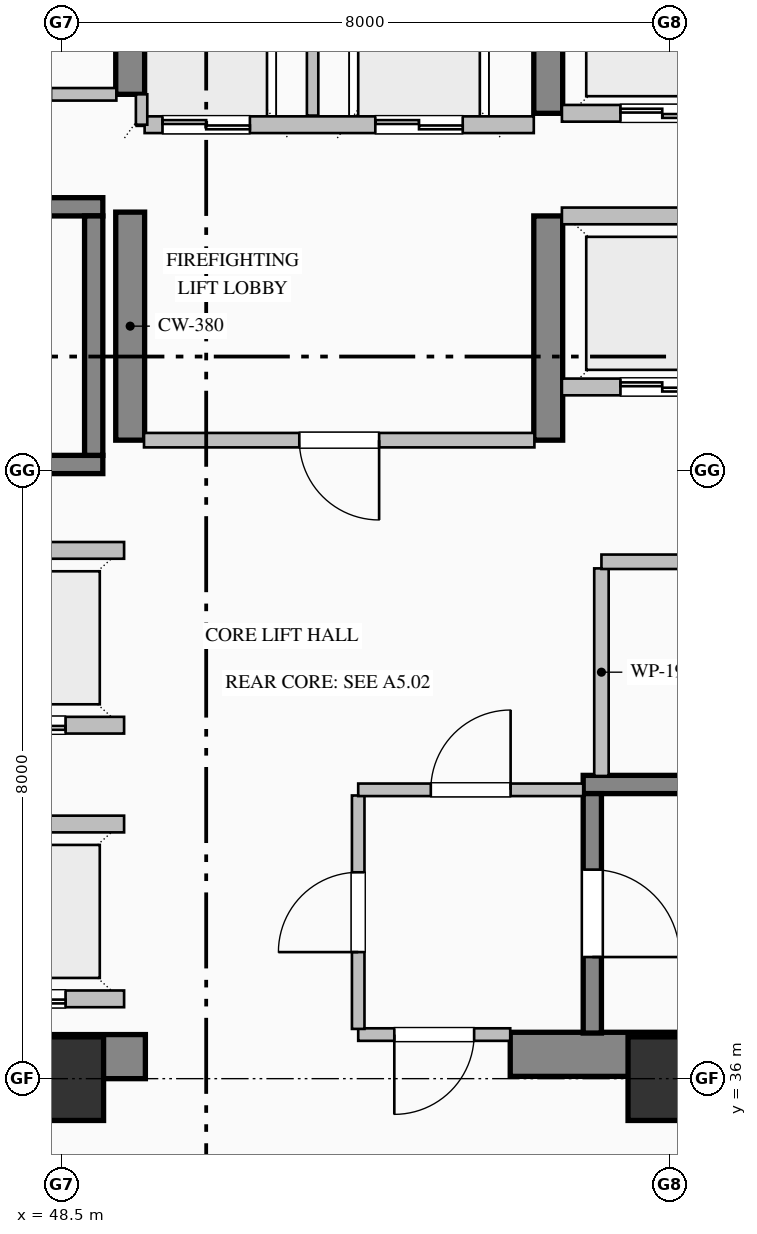
"""IFC4 building model, lengths in metres.
Left out: names, types, materials, properties, quantities, classifications, styles, units other than length and angle.
Written with IfcOpenShell. Run it as: python <this file> out.ifc"""

import sys

from ifc_helpers import new_model, si_unit, direction, frame, frame_2d, origin, origin_2d, place, context, subcontext, project, spatial, rectangle, extrude, element, fill, save


model = new_model("IFC4")
c1 = context("Model", 3, precision=1e-05, world=origin(), true_north=direction((0.0, 1.0)))
c2 = subcontext(c1, "Body", "Model", "MODEL_VIEW")
j1 = project(units=[si_unit("LENGTHUNIT", "METRE"), si_unit("PLANEANGLEUNIT", "RADIAN")], contexts=[c1])
p1 = place(None, origin())
s1 = spatial("IfcSite", under=j1, at=p1, CompositionType="ELEMENT")
p2 = place(p1, origin())
s2 = spatial("IfcBuilding", under=s1, at=p2, CompositionType="ELEMENT")
p3 = place(p2, origin())
s3 = spatial("IfcBuildingStorey", under=s2, at=p3, CompositionType="ELEMENT", Elevation=0.0)
p4 = place(p3, frame((48.2, 36.29, 0.0), z_axis=(0.0, 0.0, 1.0), x_axis=(1.0, 0.0, 0.0)))
e1 = element("IfcWall", 1, at=p4, inside=s3, PredefinedType="SHEAR", context=c2, shape_type="SweptSolid", body=[
    extrude(rectangle(XDim=1.4, YDim=0.58, at=frame_2d((0.7, 0.0))), origin(), (0.0, 0.0, 1.0), 5.72),
])
p5 = place(p3, frame((54.4, 36.32, 0.0), z_axis=(0.0, 0.0, 1.0), x_axis=(1.0, 0.0, 0.0)))
e2 = element("IfcWall", 2, at=p5, inside=s3, PredefinedType="SHEAR", context=c2, shape_type="SweptSolid", body=[
    extrude(rectangle(XDim=9.6, YDim=0.58, at=frame_2d((4.8, 0.0))), origin(), (0.0, 0.0, 1.0), 6.0),
])
p6 = place(p3, frame((49.4, 44.4, 0.0), z_axis=(0.0, 0.0, 1.0), x_axis=(0.0, 1.0, 0.0)))
e3 = element("IfcWall", 3, at=p6, inside=s3, PredefinedType="SHEAR", context=c2, shape_type="SweptSolid", body=[
    extrude(rectangle(XDim=3.0, YDim=0.38, at=frame_2d((1.5, 0.0))), origin(), (0.0, 0.0, 1.0), 5.72),
])
p7 = place(p3, frame((49.4, 48.95, 0.0), z_axis=(0.0, 0.0, 1.0), x_axis=(0.0, 1.0, 0.0)))
e4 = element("IfcWall", 4, at=p7, inside=s3, PredefinedType="SHEAR", context=c2, shape_type="SweptSolid", body=[
    extrude(rectangle(XDim=2.47, YDim=0.38, at=frame_2d((1.235, 0.0))), origin(), (0.0, 0.0, 1.0), 5.72),
])
p8 = place(p3, frame((54.9, 44.4, 0.0), z_axis=(0.0, 0.0, 1.0), x_axis=(0.0, 1.0, 0.0)))
e5 = element("IfcWall", 5, at=p8, inside=s3, PredefinedType="SHEAR", context=c2, shape_type="SweptSolid", body=[
    extrude(rectangle(XDim=2.95, YDim=0.38, at=frame_2d((1.475, 0.0))), origin(), (0.0, 0.0, 1.0), 5.72),
])
p9 = place(p3, frame((54.9, 48.7, 0.0), z_axis=(0.0, 0.0, 1.0), x_axis=(0.0, 1.0, 0.0)))
e6 = element("IfcWall", 6, at=p9, inside=s3, PredefinedType="SHEAR", context=c2, shape_type="SweptSolid", body=[
    extrude(rectangle(XDim=2.72, YDim=0.38, at=frame_2d((1.36, 0.0))), origin(), (0.0, 0.0, 1.0), 5.72),
])
for number, where, z_axis, x_axis in (
    (7, (48.5, 36.0, 0.0), (0.0, 0.0, 1.0), (1.0, 0.0, 0.0)),
    (8, (56.5, 36.0, 0.0), (0.0, 0.0, 1.0), (1.0, 0.0, 0.0)),
):
    element("IfcColumn", number, at=place(p3, frame(where, z_axis=z_axis, x_axis=x_axis)), inside=s3, PredefinedType="COLUMN", context=c2, shape_type="SweptSolid", body=[
        extrude(rectangle(XDim=1.1, YDim=1.1, at=origin_2d()), origin(), (0.0, 0.0, 1.0), 6.0),
    ])
for number, where, z_axis, x_axis in (
    (9, (40.96, 47.47, 0.0), (0.0, 0.0, 1.0), (1.0, 0.0, 0.0)),
    (10, (49.04, 44.08, 0.0), (0.0, 0.0, 1.0), (-1.0, 0.0, 0.0)),
):
    element("IfcWall", number, at=place(p3, frame(where, z_axis=z_axis, x_axis=x_axis)), inside=s3, PredefinedType="SOLIDWALL", context=c2, shape_type="SweptSolid", body=[
        extrude(rectangle(XDim=8.08, YDim=0.24, at=frame_2d((4.04, 0.0))), origin(), (0.0, 0.0, 1.0), 6.0),
    ])
p10 = place(p3, frame((48.92, 44.2, 0.0), z_axis=(0.0, 0.0, 1.0), x_axis=(0.0, 1.0, 0.0)))
e11 = element("IfcWall", 11, at=p10, inside=s3, PredefinedType="SOLIDWALL", context=c2, shape_type="SweptSolid", body=[
    extrude(rectangle(XDim=3.15, YDim=0.24, at=frame_2d((1.575, 0.0))), origin(), (0.0, 0.0, 1.0), 6.0),
])
p11 = place(p3, frame((55.36, 39.87, 0.0), z_axis=(0.0, 0.0, 1.0), x_axis=(1.0, 0.0, 0.0)))
e12 = element("IfcWall", 12, at=p11, inside=s3, PredefinedType="SOLIDWALL", context=c2, shape_type="SweptSolid", body=[
    extrude(rectangle(XDim=8.08, YDim=0.24, at=frame_2d((4.04, 0.0))), origin(), (0.0, 0.0, 1.0), 6.0),
])
p12 = place(p3, frame((55.48, 39.75, 0.0), z_axis=(0.0, 0.0, 1.0), x_axis=(0.0, -1.0, 0.0)))
e13 = element("IfcWall", 13, at=p12, inside=s3, PredefinedType="SOLIDWALL", context=c2, shape_type="SweptSolid", body=[
    extrude(rectangle(XDim=3.15, YDim=0.24, at=frame_2d((1.575, 0.0))), origin(), (0.0, 0.0, 1.0), 6.0),
])
p13 = place(p12, frame((1.0, 0.0, 0.0)))
e14 = element("IfcOpeningElement", 14, at=p13, cuts=e13, PredefinedType="OPENING", context=c2, shape_type="SweptSolid", body=[
    extrude(rectangle(XDim=1.15, YDim=2.2, at=frame_2d((0.575, 1.1))), frame((0.0, 0.13, 0.0), z_axis=(0.0, -1.0, 0.0), x_axis=(1.0, 0.0, 0.0)), (0.0, 0.0, 1.0), 0.26),
])
p14 = place(p3, frame((54.71, 48.55, 0.0), z_axis=(0.0, 0.0, 1.0), x_axis=(-1.0, 0.0, 0.0)))
e15 = element("IfcWall", 15, at=p14, inside=s3, PredefinedType="PARTITIONING", context=c2, shape_type="SweptSolid", body=[
    extrude(rectangle(XDim=5.12, YDim=0.22, at=frame_2d((2.56, 0.0))), origin(), (0.0, 0.0, 1.0), 5.72),
])
p15 = place(p14, frame((3.735, 0.0, 0.0)))
e16 = element("IfcOpeningElement", 16, at=p15, cuts=e15, PredefinedType="OPENING", context=c2, shape_type="SweptSolid", body=[
    extrude(rectangle(XDim=1.15, YDim=2.2, at=frame_2d((0.575, 1.1))), frame((0.0, 0.12, 0.0), z_axis=(0.0, -1.0, 0.0), x_axis=(1.0, 0.0, 0.0)), (0.0, 0.0, 1.0), 0.24),
])
p16 = place(p14, frame((0.935, 0.0, 0.0)))
e17 = element("IfcOpeningElement", 17, at=p16, cuts=e15, PredefinedType="OPENING", context=c2, shape_type="SweptSolid", body=[
    extrude(rectangle(XDim=1.15, YDim=2.2, at=frame_2d((0.575, 1.1))), frame((0.0, 0.12, 0.0), z_axis=(0.0, -1.0, 0.0), x_axis=(1.0, 0.0, 0.0)), (0.0, 0.0, 1.0), 0.24),
])
p17 = place(p3, frame((51.8, 48.67, 0.0), z_axis=(0.0, 0.0, 1.0), x_axis=(0.0, 1.0, 0.0)))
e18 = element("IfcWall", 18, at=p17, inside=s3, PredefinedType="PARTITIONING", context=c2, shape_type="SweptSolid", body=[
    extrude(rectangle(XDim=2.75, YDim=0.15, at=frame_2d((1.375, 0.0))), origin(), (0.0, 0.0, 1.0), 5.72),
])
p18 = place(p3, frame((49.55, 48.55, 0.0), z_axis=(0.0, 0.0, 1.0), x_axis=(0.0, 1.0, 0.0)))
e19 = element("IfcWall", 19, at=p18, inside=s3, PredefinedType="PARTITIONING", context=c2, shape_type="SweptSolid", body=[
    extrude(rectangle(XDim=0.4, YDim=0.15, at=frame_2d((0.2, 0.0))), origin(), (0.0, 0.0, 1.0), 5.72),
])
p19 = place(p3, frame((49.32, 37.05, 0.0), z_axis=(0.0, 0.0, 1.0), x_axis=(-1.0, 0.0, 0.0)))
e20 = element("IfcWall", 20, at=p19, inside=s3, PredefinedType="PARTITIONING", context=c2, shape_type="SweptSolid", body=[
    extrude(rectangle(XDim=8.24, YDim=0.22, at=frame_2d((4.12, 0.0))), origin(), (0.0, 0.0, 1.0), 5.72),
])
p20 = place(p19, frame((6.37, 0.0, 0.0)))
e21 = element("IfcOpeningElement", 21, at=p20, cuts=e20, PredefinedType="OPENING", context=c2, shape_type="SweptSolid", body=[
    extrude(rectangle(XDim=1.1, YDim=2.2, at=frame_2d((0.55, 1.1))), frame((0.0, 0.12, 0.0), z_axis=(0.0, -1.0, 0.0), x_axis=(1.0, 0.0, 0.0)), (0.0, 0.0, 1.0), 0.24),
])
p21 = place(p19, frame((3.57, 0.0, 0.0)))
e22 = element("IfcOpeningElement", 22, at=p21, cuts=e20, PredefinedType="OPENING", context=c2, shape_type="SweptSolid", body=[
    extrude(rectangle(XDim=1.1, YDim=2.2, at=frame_2d((0.55, 1.1))), frame((0.0, 0.12, 0.0), z_axis=(0.0, -1.0, 0.0), x_axis=(1.0, 0.0, 0.0)), (0.0, 0.0, 1.0), 0.24),
])
p22 = place(p19, frame((0.77, 0.0, 0.0)))
e23 = element("IfcOpeningElement", 23, at=p22, cuts=e20, PredefinedType="OPENING", context=c2, shape_type="SweptSolid", body=[
    extrude(rectangle(XDim=1.1, YDim=2.2, at=frame_2d((0.55, 1.1))), frame((0.0, 0.12, 0.0), z_axis=(0.0, -1.0, 0.0), x_axis=(1.0, 0.0, 0.0)), (0.0, 0.0, 1.0), 0.24),
])
p23 = place(p3, frame((41.08, 39.35, 0.0), z_axis=(0.0, 0.0, 1.0), x_axis=(1.0, 0.0, 0.0)))
e24 = element("IfcWall", 24, at=p23, inside=s3, PredefinedType="PARTITIONING", context=c2, shape_type="SweptSolid", body=[
    extrude(rectangle(XDim=8.24, YDim=0.22, at=frame_2d((4.12, 0.0))), origin(), (0.0, 0.0, 1.0), 5.72),
])
p24 = place(p3, frame((49.32, 40.65, 0.0), z_axis=(0.0, 0.0, 1.0), x_axis=(-1.0, 0.0, 0.0)))
e25 = element("IfcWall", 25, at=p24, inside=s3, PredefinedType="PARTITIONING", context=c2, shape_type="SweptSolid", body=[
    extrude(rectangle(XDim=8.24, YDim=0.22, at=frame_2d((4.12, 0.0))), origin(), (0.0, 0.0, 1.0), 5.72),
])
p25 = place(p24, frame((6.37, 0.0, 0.0)))
e26 = element("IfcOpeningElement", 26, at=p25, cuts=e25, PredefinedType="OPENING", context=c2, shape_type="SweptSolid", body=[
    extrude(rectangle(XDim=1.1, YDim=2.2, at=frame_2d((0.55, 1.1))), frame((0.0, 0.12, 0.0), z_axis=(0.0, -1.0, 0.0), x_axis=(1.0, 0.0, 0.0)), (0.0, 0.0, 1.0), 0.24),
])
p26 = place(p24, frame((3.57, 0.0, 0.0)))
e27 = element("IfcOpeningElement", 27, at=p26, cuts=e25, PredefinedType="OPENING", context=c2, shape_type="SweptSolid", body=[
    extrude(rectangle(XDim=1.1, YDim=2.2, at=frame_2d((0.55, 1.1))), frame((0.0, 0.12, 0.0), z_axis=(0.0, -1.0, 0.0), x_axis=(1.0, 0.0, 0.0)), (0.0, 0.0, 1.0), 0.24),
])
p27 = place(p24, frame((0.77, 0.0, 0.0)))
e28 = element("IfcOpeningElement", 28, at=p27, cuts=e25, PredefinedType="OPENING", context=c2, shape_type="SweptSolid", body=[
    extrude(rectangle(XDim=1.1, YDim=2.2, at=frame_2d((0.55, 1.1))), frame((0.0, 0.12, 0.0), z_axis=(0.0, -1.0, 0.0), x_axis=(1.0, 0.0, 0.0)), (0.0, 0.0, 1.0), 0.24),
])
p28 = place(p3, frame((41.08, 42.95, 0.0), z_axis=(0.0, 0.0, 1.0), x_axis=(1.0, 0.0, 0.0)))
e29 = element("IfcWall", 29, at=p28, inside=s3, PredefinedType="PARTITIONING", context=c2, shape_type="SweptSolid", body=[
    extrude(rectangle(XDim=8.24, YDim=0.22, at=frame_2d((4.12, 0.0))), origin(), (0.0, 0.0, 1.0), 5.72),
])
p29 = place(p3, frame((63.32, 45.1, 0.0), z_axis=(0.0, 0.0, 1.0), x_axis=(-1.0, 0.0, 0.0)))
e30 = element("IfcWall", 30, at=p29, inside=s3, PredefinedType="PARTITIONING", context=c2, shape_type="SweptSolid", body=[
    extrude(rectangle(XDim=8.24, YDim=0.22, at=frame_2d((4.12, 0.0))), origin(), (0.0, 0.0, 1.0), 5.72),
])
p30 = place(p29, frame((6.37, 0.0, 0.0)))
e31 = element("IfcOpeningElement", 31, at=p30, cuts=e30, PredefinedType="OPENING", context=c2, shape_type="SweptSolid", body=[
    extrude(rectangle(XDim=1.1, YDim=2.2, at=frame_2d((0.55, 1.1))), frame((0.0, 0.12, 0.0), z_axis=(0.0, -1.0, 0.0), x_axis=(1.0, 0.0, 0.0)), (0.0, 0.0, 1.0), 0.24),
])
p31 = place(p29, frame((3.57, 0.0, 0.0)))
e32 = element("IfcOpeningElement", 32, at=p31, cuts=e30, PredefinedType="OPENING", context=c2, shape_type="SweptSolid", body=[
    extrude(rectangle(XDim=1.1, YDim=2.2, at=frame_2d((0.55, 1.1))), frame((0.0, 0.12, 0.0), z_axis=(0.0, -1.0, 0.0), x_axis=(1.0, 0.0, 0.0)), (0.0, 0.0, 1.0), 0.24),
])
p32 = place(p29, frame((0.77, 0.0, 0.0)))
e33 = element("IfcOpeningElement", 33, at=p32, cuts=e30, PredefinedType="OPENING", context=c2, shape_type="SweptSolid", body=[
    extrude(rectangle(XDim=1.1, YDim=2.2, at=frame_2d((0.55, 1.1))), frame((0.0, 0.12, 0.0), z_axis=(0.0, -1.0, 0.0), x_axis=(1.0, 0.0, 0.0)), (0.0, 0.0, 1.0), 0.24),
])
p33 = place(p3, frame((55.08, 47.35, 0.0), z_axis=(0.0, 0.0, 1.0), x_axis=(1.0, 0.0, 0.0)))
e34 = element("IfcWall", 34, at=p33, inside=s3, PredefinedType="PARTITIONING", context=c2, shape_type="SweptSolid", body=[
    extrude(rectangle(XDim=8.24, YDim=0.22, at=frame_2d((4.12, 0.0))), origin(), (0.0, 0.0, 1.0), 5.72),
])
p34 = place(p3, frame((63.32, 48.7, 0.0), z_axis=(0.0, 0.0, 1.0), x_axis=(-1.0, 0.0, 0.0)))
e35 = element("IfcWall", 35, at=p34, inside=s3, PredefinedType="PARTITIONING", context=c2, shape_type="SweptSolid", body=[
    extrude(rectangle(XDim=8.24, YDim=0.22, at=frame_2d((4.12, 0.0))), origin(), (0.0, 0.0, 1.0), 5.72),
])
p35 = place(p34, frame((6.37, 0.0, 0.0)))
e36 = element("IfcOpeningElement", 36, at=p35, cuts=e35, PredefinedType="OPENING", context=c2, shape_type="SweptSolid", body=[
    extrude(rectangle(XDim=1.1, YDim=2.2, at=frame_2d((0.55, 1.1))), frame((0.0, 0.12, 0.0), z_axis=(0.0, -1.0, 0.0), x_axis=(1.0, 0.0, 0.0)), (0.0, 0.0, 1.0), 0.24),
])
p36 = place(p34, frame((3.57, 0.0, 0.0)))
e37 = element("IfcOpeningElement", 37, at=p36, cuts=e35, PredefinedType="OPENING", context=c2, shape_type="SweptSolid", body=[
    extrude(rectangle(XDim=1.1, YDim=2.2, at=frame_2d((0.55, 1.1))), frame((0.0, 0.12, 0.0), z_axis=(0.0, -1.0, 0.0), x_axis=(1.0, 0.0, 0.0)), (0.0, 0.0, 1.0), 0.24),
])
p37 = place(p34, frame((0.77, 0.0, 0.0)))
e38 = element("IfcOpeningElement", 38, at=p37, cuts=e35, PredefinedType="OPENING", context=c2, shape_type="SweptSolid", body=[
    extrude(rectangle(XDim=1.1, YDim=2.2, at=frame_2d((0.55, 1.1))), frame((0.0, 0.12, 0.0), z_axis=(0.0, -1.0, 0.0), x_axis=(1.0, 0.0, 0.0)), (0.0, 0.0, 1.0), 0.24),
])
p38 = place(p3, frame((46.6, 48.95, 0.0), z_axis=(0.0, 0.0, 1.0), x_axis=(1.0, 0.0, 0.0)))
e39 = element("IfcWall", 39, at=p38, inside=s3, PredefinedType="PARTITIONING", context=c2, shape_type="SweptSolid", body=[
    extrude(rectangle(XDim=2.618, YDim=0.165, at=frame_2d((1.309, 0.0))), origin(), (0.0, 0.0, 1.0), 5.72),
])
p39 = place(p38, frame((0.859, 0.0, 0.0)))
e40 = element("IfcOpeningElement", 40, at=p39, cuts=e39, PredefinedType="OPENING", context=c2, shape_type="SweptSolid", body=[
    extrude(rectangle(XDim=0.9, YDim=2.15, at=frame_2d((0.45, 1.075))), frame((0.0, 0.093, 0.0), z_axis=(0.0, -1.0, 0.0), x_axis=(1.0, 0.0, 0.0)), (0.0, 0.0, 1.0), 0.185),
])
p40 = place(p3, frame((54.4, 36.58, 0.0), z_axis=(0.0, 0.0, 1.0), x_axis=(-1.0, 0.0, 0.0)))
e41 = element("IfcWall", 41, at=p40, inside=s3, PredefinedType="PARTITIONING", context=c2, shape_type="SweptSolid", body=[
    extrude(rectangle(XDim=2.0, YDim=0.165, at=frame_2d((1.0, 0.0))), origin(), (0.0, 0.0, 1.0), 4.812),
])
p41 = place(p40, frame((0.475, 0.0, 0.0)))
e42 = element("IfcOpeningElement", 42, at=p41, cuts=e41, PredefinedType="OPENING", context=c2, shape_type="SweptSolid", body=[
    extrude(rectangle(XDim=1.05, YDim=2.15, at=frame_2d((0.525, 1.075))), frame((0.0, 0.093, 0.0), z_axis=(0.0, -1.0, 0.0), x_axis=(1.0, 0.0, 0.0)), (0.0, 0.0, 1.0), 0.185),
])
p42 = place(p3, frame((52.4, 36.655, 0.0), z_axis=(0.0, 0.0, 1.0), x_axis=(0.0, 1.0, 0.0)))
e43 = element("IfcWall", 43, at=p42, inside=s3, PredefinedType="PARTITIONING", context=c2, shape_type="SweptSolid", body=[
    extrude(rectangle(XDim=3.071, YDim=0.165, at=frame_2d((1.536, 0.0))), origin(), (0.0, 0.0, 1.0), 5.72),
])
p43 = place(p42, frame((1.01, 0.0, 0.0)))
e44 = element("IfcOpeningElement", 44, at=p43, cuts=e43, PredefinedType="OPENING", context=c2, shape_type="SweptSolid", body=[
    extrude(rectangle(XDim=1.05, YDim=2.15, at=frame_2d((0.525, 1.075))), frame((0.0, 0.093, 0.0), z_axis=(0.0, -1.0, 0.0), x_axis=(1.0, 0.0, 0.0)), (0.0, 0.0, 1.0), 0.185),
])
p44 = place(p3, frame((52.4, 39.8, 0.0), z_axis=(0.0, 0.0, 1.0), x_axis=(1.0, 0.0, 0.0)))
e45 = element("IfcWall", 45, at=p44, inside=s3, PredefinedType="PARTITIONING", context=c2, shape_type="SweptSolid", body=[
    extrude(rectangle(XDim=2.96, YDim=0.165, at=frame_2d((1.48, 0.0))), origin(), (0.0, 0.0, 1.0), 5.72),
])
p45 = place(p44, frame((0.955, 0.0, 0.0)))
e46 = element("IfcOpeningElement", 46, at=p45, cuts=e45, PredefinedType="OPENING", context=c2, shape_type="SweptSolid", body=[
    extrude(rectangle(XDim=1.05, YDim=2.15, at=frame_2d((0.525, 1.075))), frame((0.0, 0.093, 0.0), z_axis=(0.0, -1.0, 0.0), x_axis=(1.0, 0.0, 0.0)), (0.0, 0.0, 1.0), 0.185),
])
p46 = place(p3, frame((54.718, 44.4, 0.0), z_axis=(0.0, 0.0, 1.0), x_axis=(-1.0, 0.0, 0.0)))
e47 = element("IfcWall", 47, at=p46, inside=s3, PredefinedType="PARTITIONING", context=c2, shape_type="SweptSolid", body=[
    extrude(rectangle(XDim=5.136, YDim=0.19, at=frame_2d((2.568, 0.0))), origin(), (0.0, 0.0, 1.0), 5.72),
])
p47 = place(p46, frame((2.043, 0.0, 0.0)))
e48 = element("IfcOpeningElement", 48, at=p47, cuts=e47, PredefinedType="OPENING", context=c2, shape_type="SweptSolid", body=[
    extrude(rectangle(XDim=1.05, YDim=2.15, at=frame_2d((0.525, 1.075))), frame((0.0, 0.105, 0.0), z_axis=(0.0, -1.0, 0.0), x_axis=(1.0, 0.0, 0.0)), (0.0, 0.0, 1.0), 0.21),
])
p48 = place(p3, frame((55.6, 42.713, 0.0), z_axis=(0.0, 0.0, 1.0), x_axis=(0.0, -1.0, 0.0)))
e49 = element("IfcWall", 49, at=p48, inside=s3, PredefinedType="PARTITIONING", context=c2, shape_type="SweptSolid", body=[
    extrude(rectangle(XDim=2.731, YDim=0.19, at=frame_2d((1.365, 0.0))), origin(), (0.0, 0.0, 1.0), 5.72),
])
p49 = place(p3, frame((63.42, 42.8, 0.0), z_axis=(0.0, 0.0, 1.0), x_axis=(-1.0, 0.0, 0.0)))
e50 = element("IfcWall", 50, at=p49, inside=s3, PredefinedType="PARTITIONING", context=c2, shape_type="SweptSolid", body=[
    extrude(rectangle(XDim=7.82, YDim=0.19, at=frame_2d((3.91, 0.0))), origin(), (0.0, 0.0, 1.0), 5.72),
])
p50 = place(p49, frame((3.21, 0.0, 0.0)))
e51 = element("IfcOpeningElement", 51, at=p50, cuts=e50, PredefinedType="OPENING", context=c2, shape_type="SweptSolid", body=[
    extrude(rectangle(XDim=1.4, YDim=2.25, at=frame_2d((0.7, 1.125))), frame((0.0, 0.105, 0.0), z_axis=(0.0, -1.0, 0.0), x_axis=(1.0, 0.0, 0.0)), (0.0, 0.0, 1.0), 0.21),
])
p51 = place(p13, origin())
e52 = element("IfcDoor", 52, at=p51, inside=s3, OperationType="SINGLE_SWING_RIGHT", PredefinedType="DOOR", context=c2, shape_type="SweptSolid", body=[
    extrude(rectangle(XDim=1.15, YDim=2.2, at=frame_2d((0.575, 1.1))), frame((0.0, 0.025, 0.0), z_axis=(0.0, -1.0, 0.0), x_axis=(1.0, 0.0, 0.0)), (0.0, 0.0, 1.0), 0.05),
])
fill(e14, e52)
p52 = place(p15, origin())
e53 = element("IfcDoor", 53, at=p52, inside=s3, OperationType="DOUBLE_DOOR_SLIDING", PredefinedType="DOOR", context=c2, shape_type="SweptSolid", body=[
    extrude(rectangle(XDim=1.15, YDim=2.2, at=frame_2d((0.575, 1.1))), frame((0.0, 0.025, 0.0), z_axis=(0.0, -1.0, 0.0), x_axis=(1.0, 0.0, 0.0)), (0.0, 0.0, 1.0), 0.05),
])
fill(e16, e53)
p53 = place(p16, origin())
e54 = element("IfcDoor", 54, at=p53, inside=s3, OperationType="DOUBLE_DOOR_SLIDING", PredefinedType="DOOR", context=c2, shape_type="SweptSolid", body=[
    extrude(rectangle(XDim=1.15, YDim=2.2, at=frame_2d((0.575, 1.1))), frame((0.0, 0.025, 0.0), z_axis=(0.0, -1.0, 0.0), x_axis=(1.0, 0.0, 0.0)), (0.0, 0.0, 1.0), 0.05),
])
fill(e17, e54)
p54 = place(p22, origin())
e55 = element("IfcDoor", 55, at=p54, inside=s3, OperationType="DOUBLE_DOOR_SLIDING", PredefinedType="DOOR", context=c2, shape_type="SweptSolid", body=[
    extrude(rectangle(XDim=1.1, YDim=2.2, at=frame_2d((0.55, 1.1))), frame((0.0, 0.025, 0.0), z_axis=(0.0, -1.0, 0.0), x_axis=(1.0, 0.0, 0.0)), (0.0, 0.0, 1.0), 0.05),
])
fill(e23, e55)
p55 = place(p27, origin())
e56 = element("IfcDoor", 56, at=p55, inside=s3, OperationType="DOUBLE_DOOR_SLIDING", PredefinedType="DOOR", context=c2, shape_type="SweptSolid", body=[
    extrude(rectangle(XDim=1.1, YDim=2.2, at=frame_2d((0.55, 1.1))), frame((0.0, 0.025, 0.0), z_axis=(0.0, -1.0, 0.0), x_axis=(1.0, 0.0, 0.0)), (0.0, 0.0, 1.0), 0.05),
])
fill(e28, e56)
p56 = place(p30, origin())
e57 = element("IfcDoor", 57, at=p56, inside=s3, OperationType="DOUBLE_DOOR_SLIDING", PredefinedType="DOOR", context=c2, shape_type="SweptSolid", body=[
    extrude(rectangle(XDim=1.1, YDim=2.2, at=frame_2d((0.55, 1.1))), frame((0.0, 0.025, 0.0), z_axis=(0.0, -1.0, 0.0), x_axis=(1.0, 0.0, 0.0)), (0.0, 0.0, 1.0), 0.05),
])
fill(e31, e57)
p57 = place(p35, origin())
e58 = element("IfcDoor", 58, at=p57, inside=s3, OperationType="DOUBLE_DOOR_SLIDING", PredefinedType="DOOR", context=c2, shape_type="SweptSolid", body=[
    extrude(rectangle(XDim=1.1, YDim=2.2, at=frame_2d((0.55, 1.1))), frame((0.0, 0.025, 0.0), z_axis=(0.0, -1.0, 0.0), x_axis=(1.0, 0.0, 0.0)), (0.0, 0.0, 1.0), 0.05),
])
fill(e36, e58)
p58 = place(p47, origin())
e59 = element("IfcDoor", 59, at=p58, inside=s3, OperationType="SINGLE_SWING_LEFT", PredefinedType="DOOR", context=c2, shape_type="SweptSolid", body=[
    extrude(rectangle(XDim=1.05, YDim=2.15, at=frame_2d((0.525, 1.075))), frame((0.0, 0.025, 0.0), z_axis=(0.0, -1.0, 0.0), x_axis=(1.0, 0.0, 0.0)), (0.0, 0.0, 1.0), 0.05),
])
fill(e48, e59)
p59 = place(p43, origin())
e60 = element("IfcDoor", 60, at=p59, inside=s3, OperationType="SINGLE_SWING_LEFT", PredefinedType="DOOR", context=c2, shape_type="SweptSolid", body=[
    extrude(rectangle(XDim=1.05, YDim=2.15, at=frame_2d((0.525, 1.075))), frame((0.0, 0.025, 0.0), z_axis=(0.0, -1.0, 0.0), x_axis=(1.0, 0.0, 0.0)), (0.0, 0.0, 1.0), 0.05),
])
fill(e44, e60)
p60 = place(p45, origin())
e61 = element("IfcDoor", 61, at=p60, inside=s3, OperationType="SINGLE_SWING_RIGHT", PredefinedType="DOOR", context=c2, shape_type="SweptSolid", body=[
    extrude(rectangle(XDim=1.05, YDim=2.15, at=frame_2d((0.525, 1.075))), frame((0.0, 0.025, 0.0), z_axis=(0.0, -1.0, 0.0), x_axis=(1.0, 0.0, 0.0)), (0.0, 0.0, 1.0), 0.05),
])
fill(e46, e61)
p61 = place(p41, origin())
e62 = element("IfcDoor", 62, at=p61, inside=s3, OperationType="SINGLE_SWING_RIGHT", PredefinedType="DOOR", context=c2, shape_type="SweptSolid", body=[
    extrude(rectangle(XDim=1.05, YDim=2.15, at=frame_2d((0.525, 1.075))), frame((0.0, 0.025, 0.0), z_axis=(0.0, -1.0, 0.0), x_axis=(1.0, 0.0, 0.0)), (0.0, 0.0, 1.0), 0.05),
])
fill(e42, e62)
save(model, sys.argv[1])
